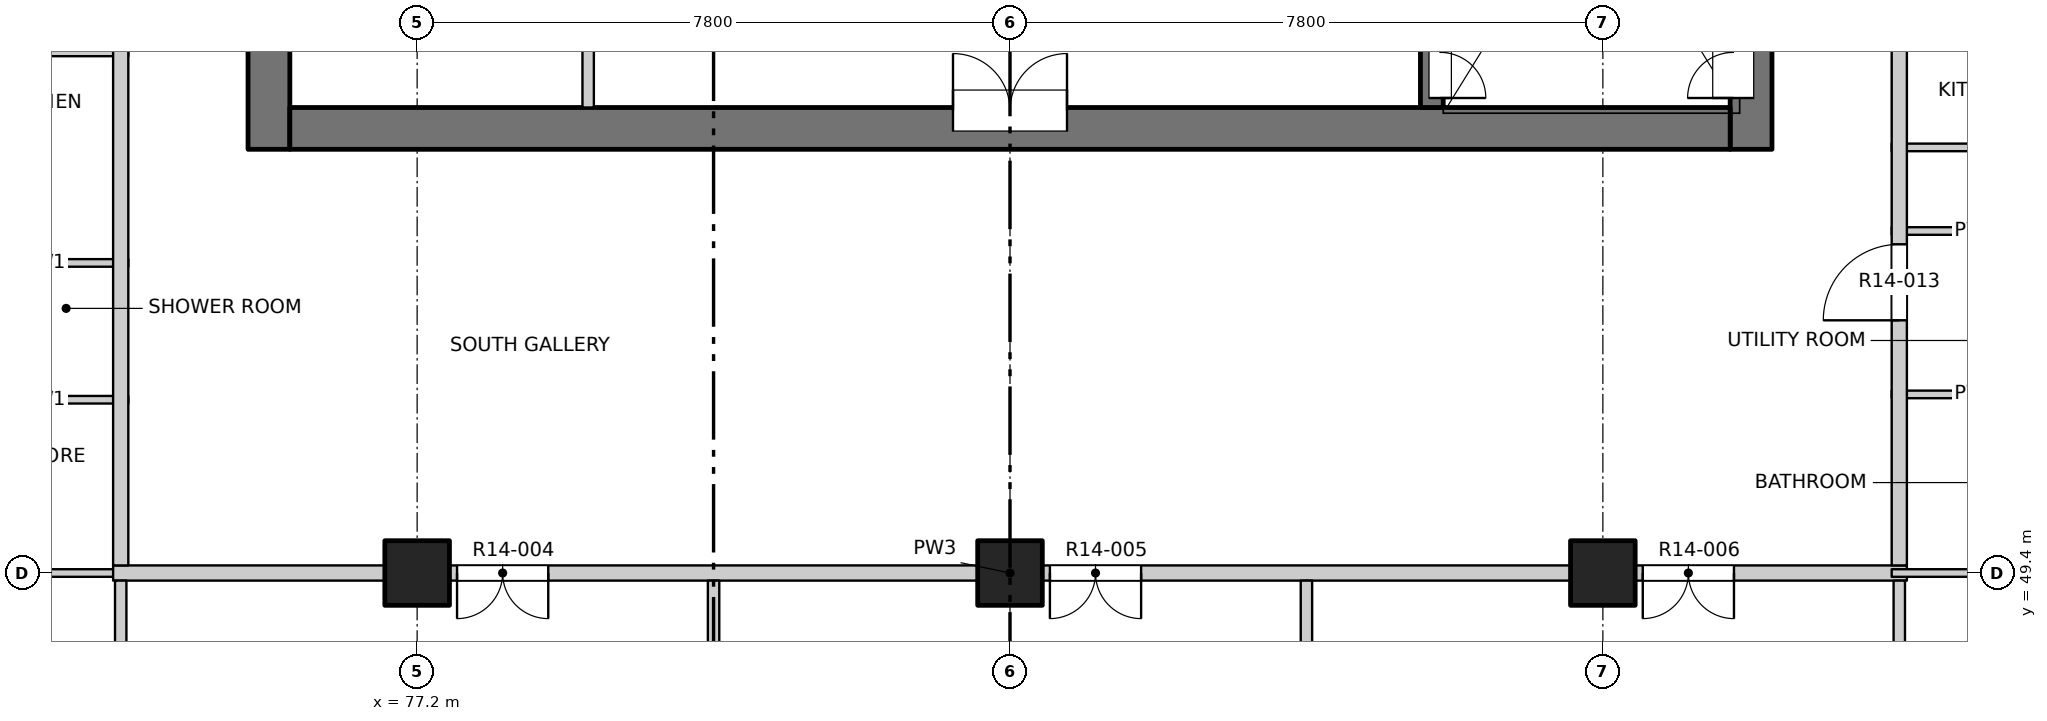
"""IFC4 building model, lengths in metres.
Left out: names, types, materials, properties, quantities, classifications, styles, units other than length and angle.
Written with IfcOpenShell. Run it as: python <this file> out.ifc"""

import sys

from ifc_helpers import new_model, si_unit, direction, frame, frame_2d, origin, origin_2d, place, context, subcontext, project, spatial, rectangle, extrude, element, fill, save


model = new_model("IFC4")
c1 = context("Model", 3, precision=1e-05, world=origin(), true_north=direction((0.0, 1.0)))
c2 = subcontext(c1, "Body", "Model", "MODEL_VIEW")
j1 = project(units=[si_unit("LENGTHUNIT", "METRE"), si_unit("PLANEANGLEUNIT", "RADIAN")], contexts=[c1])
p1 = place(None, origin())
s1 = spatial("IfcSite", under=j1, at=p1, CompositionType="ELEMENT")
p2 = place(p1, origin())
s2 = spatial("IfcBuilding", under=s1, at=p2, CompositionType="ELEMENT")
p3 = place(p2, frame((0.0, 0.0, 155.4)))
s3 = spatial("IfcBuildingStorey", under=s2, at=p3, CompositionType="ELEMENT", Elevation=155.4)
for number, where, z_axis, x_axis in (
    (1, (77.2, 49.4, -0.25), (0.0, 0.0, 1.0), (1.0, 0.0, 0.0)),
    (2, (85.0, 49.4, -0.25), (0.0, 0.0, 1.0), (1.0, 0.0, 0.0)),
    (3, (92.8, 49.4, -0.25), (0.0, 0.0, 1.0), (1.0, 0.0, 0.0)),
):
    element("IfcColumn", number, at=place(p3, frame(where, z_axis=z_axis, x_axis=x_axis)), inside=s3, PredefinedType="COLUMN", context=c2, shape_type="SweptSolid", body=[
        extrude(rectangle(XDim=0.85, YDim=0.85, at=origin_2d()), origin(), (0.0, 0.0, 1.0), 3.4),
    ])
p4 = place(p3, frame((75.25, 54.975, -0.25), z_axis=(0.0, 0.0, 1.0), x_axis=(0.0, 1.0, 0.0)))
e4 = element("IfcWall", 4, at=p4, inside=s3, PredefinedType="SOLIDWALL", context=c2, shape_type="SweptSolid", body=[
    extrude(rectangle(XDim=22.325, YDim=0.55, at=frame_2d((11.163, 0.0))), origin(), (0.0, 0.0, 1.0), 3.4),
])
p5 = place(p4, frame((7.475, 0.0, 0.25)))
e5 = element("IfcOpeningElement", 5, at=p5, cuts=e4, PredefinedType="OPENING", context=c2, shape_type="SweptSolid", body=[
    extrude(rectangle(XDim=0.9, YDim=2.1, at=frame_2d((0.45, 1.05))), frame((0.0, 0.285, 0.0), z_axis=(0.0, -1.0, 0.0), x_axis=(1.0, 0.0, 0.0)), (0.0, 0.0, 1.0), 0.57),
])
p6 = place(p4, frame((13.775, 0.0, 0.25)))
e6 = element("IfcOpeningElement", 6, at=p6, cuts=e4, PredefinedType="OPENING", context=c2, shape_type="SweptSolid", body=[
    extrude(rectangle(XDim=0.9, YDim=2.1, at=frame_2d((0.45, 1.05))), frame((0.0, 0.285, 0.0), z_axis=(0.0, -1.0, 0.0), x_axis=(1.0, 0.0, 0.0)), (0.0, 0.0, 1.0), 0.57),
])
p7 = place(p4, frame((20.075, 0.0, 0.25)))
e7 = element("IfcOpeningElement", 7, at=p7, cuts=e4, PredefinedType="OPENING", context=c2, shape_type="SweptSolid", body=[
    extrude(rectangle(XDim=0.9, YDim=2.1, at=frame_2d((0.45, 1.05))), frame((0.0, 0.285, 0.0), z_axis=(0.0, -1.0, 0.0), x_axis=(1.0, 0.0, 0.0)), (0.0, 0.0, 1.0), 0.57),
])
p8 = place(p3, frame((94.75, 54.975, -0.25), z_axis=(0.0, 0.0, 1.0), x_axis=(0.0, 1.0, 0.0)))
e8 = element("IfcWall", 8, at=p8, inside=s3, PredefinedType="SOLIDWALL", context=c2, shape_type="SweptSolid", body=[
    extrude(rectangle(XDim=6.975, YDim=0.55, at=frame_2d((3.487, 0.0))), origin(), (0.0, 0.0, 1.0), 3.4),
])
p9 = place(p8, frame((0.675, 0.0, 0.25)))
e9 = element("IfcOpeningElement", 9, at=p9, cuts=e8, PredefinedType="OPENING", context=c2, shape_type="SweptSolid", body=[
    extrude(rectangle(XDim=1.2, YDim=2.1, at=frame_2d((0.6, 1.05))), frame((0.0, 0.285, 0.0), z_axis=(0.0, -1.0, 0.0), x_axis=(1.0, 0.0, 0.0)), (0.0, 0.0, 1.0), 0.57),
])
p10 = place(p3, frame((75.525, 55.25, -0.25), z_axis=(0.0, 0.0, 1.0), x_axis=(1.0, 0.0, 0.0)))
e10 = element("IfcWall", 10, at=p10, inside=s3, PredefinedType="SOLIDWALL", context=c2, shape_type="SweptSolid", body=[
    extrude(rectangle(XDim=18.95, YDim=0.55, at=frame_2d((9.475, 0.0))), origin(), (0.0, 0.0, 1.0), 3.4),
])
p11 = place(p10, frame((8.725, 0.0, 0.25)))
e11 = element("IfcOpeningElement", 11, at=p11, cuts=e10, PredefinedType="OPENING", context=c2, shape_type="SweptSolid", body=[
    extrude(rectangle(XDim=1.5, YDim=2.1, at=frame_2d((0.75, 1.05))), frame((0.0, 0.285, 0.0), z_axis=(0.0, -1.0, 0.0), x_axis=(1.0, 0.0, 0.0)), (0.0, 0.0, 1.0), 0.57),
])
p12 = place(p3, frame((90.55, 55.525, -0.25), z_axis=(0.0, 0.0, 1.0), x_axis=(0.0, 1.0, 0.0)))
e12 = element("IfcWall", 12, at=p12, inside=s3, PredefinedType="SOLIDWALL", context=c2, shape_type="SweptSolid", body=[
    extrude(rectangle(XDim=6.425, YDim=0.3, at=frame_2d((3.212, 0.0))), origin(), (0.0, 0.0, 1.0), 3.4),
])
p13 = place(p12, frame((0.125, 0.0, 0.25)))
e13 = element("IfcOpeningElement", 13, at=p13, cuts=e12, PredefinedType="OPENING", context=c2, shape_type="SweptSolid", body=[
    extrude(rectangle(XDim=1.2, YDim=2.1, at=frame_2d((0.6, 1.05))), frame((0.0, 0.16, 0.0), z_axis=(0.0, -1.0, 0.0), x_axis=(1.0, 0.0, 0.0)), (0.0, 0.0, 1.0), 0.32),
])
p14 = place(p3, frame((65.8, 49.4, 0.0), z_axis=(0.0, 0.0, 1.0), x_axis=(1.0, 0.0, 0.0)))
e14 = element("IfcWall", 14, at=p14, inside=s3, PredefinedType="PARTITIONING", context=c2, shape_type="SweptSolid", body=[
    extrude(rectangle(XDim=7.6, YDim=0.1, at=frame_2d((3.8, 0.0))), origin(), (0.0, 0.0, 1.0), 3.15),
])
p15 = place(p14, frame((4.14, 0.0, 0.0)))
e15 = element("IfcOpeningElement", 15, at=p15, cuts=e14, PredefinedType="OPENING", context=c2, shape_type="SweptSolid", body=[
    extrude(rectangle(XDim=0.9, YDim=2.1, at=frame_2d((0.45, 1.05))), frame((0.0, 0.06, 0.0), z_axis=(0.0, -1.0, 0.0), x_axis=(1.0, 0.0, 0.0)), (0.0, 0.0, 1.0), 0.12),
])
p16 = place(p3, frame((73.2, 49.4, 0.0), z_axis=(0.0, 0.0, 1.0), x_axis=(1.0, 0.0, 0.0)))
e16 = element("IfcWall", 16, at=p16, inside=s3, PredefinedType="PARTITIONING", context=c2, shape_type="SweptSolid", body=[
    extrude(rectangle(XDim=23.6, YDim=0.2, at=frame_2d((11.8, 0.0))), origin(), (0.0, 0.0, 1.0), 3.15),
])
p17 = place(p16, frame((4.525, 0.0, 0.0)))
e17 = element("IfcOpeningElement", 17, at=p17, cuts=e16, PredefinedType="OPENING", context=c2, shape_type="SweptSolid", body=[
    extrude(rectangle(XDim=1.2, YDim=2.1, at=frame_2d((0.6, 1.05))), frame((0.0, 0.11, 0.0), z_axis=(0.0, -1.0, 0.0), x_axis=(1.0, 0.0, 0.0)), (0.0, 0.0, 1.0), 0.22),
])
p18 = place(p16, frame((12.325, 0.0, 0.0)))
e18 = element("IfcOpeningElement", 18, at=p18, cuts=e16, PredefinedType="OPENING", context=c2, shape_type="SweptSolid", body=[
    extrude(rectangle(XDim=1.2, YDim=2.1, at=frame_2d((0.6, 1.05))), frame((0.0, 0.11, 0.0), z_axis=(0.0, -1.0, 0.0), x_axis=(1.0, 0.0, 0.0)), (0.0, 0.0, 1.0), 0.22),
])
p19 = place(p16, frame((20.125, 0.0, 0.0)))
e19 = element("IfcOpeningElement", 19, at=p19, cuts=e16, PredefinedType="OPENING", context=c2, shape_type="SweptSolid", body=[
    extrude(rectangle(XDim=1.2, YDim=2.1, at=frame_2d((0.6, 1.05))), frame((0.0, 0.11, 0.0), z_axis=(0.0, -1.0, 0.0), x_axis=(1.0, 0.0, 0.0)), (0.0, 0.0, 1.0), 0.22),
])
p20 = place(p3, frame((96.6, 49.4, 0.0), z_axis=(0.0, 0.0, 1.0), x_axis=(1.0, 0.0, 0.0)))
e20 = element("IfcWall", 20, at=p20, inside=s3, PredefinedType="PARTITIONING", context=c2, shape_type="SweptSolid", body=[
    extrude(rectangle(XDim=7.6, YDim=0.1, at=frame_2d((3.8, 0.0))), origin(), (0.0, 0.0, 1.0), 3.15),
])
p21 = place(p20, frame((2.56, 0.0, 0.0)))
e21 = element("IfcOpeningElement", 21, at=p21, cuts=e20, PredefinedType="OPENING", context=c2, shape_type="SweptSolid", body=[
    extrude(rectangle(XDim=0.9, YDim=2.1, at=frame_2d((0.45, 1.05))), frame((0.0, 0.06, 0.0), z_axis=(0.0, -1.0, 0.0), x_axis=(1.0, 0.0, 0.0)), (0.0, 0.0, 1.0), 0.12),
])
for number, where, z_axis, x_axis in (
    (22, (71.18, 51.68, 0.0), (0.0, 0.0, 1.0), (1.0, 0.0, 0.0)),
    (23, (96.6, 51.75, 0.0), (0.0, 0.0, 1.0), (1.0, 0.0, 0.0)),
    (24, (71.18, 53.48, 0.0), (0.0, 0.0, 1.0), (1.0, 0.0, 0.0)),
    (25, (96.6, 53.9, 0.0), (0.0, 0.0, 1.0), (1.0, 0.0, 0.0)),
    (26, (96.6, 55.0, 0.0), (0.0, 0.0, 1.0), (1.0, 0.0, 0.0)),
    (27, (71.18, 56.25, 0.0), (0.0, 0.0, 1.0), (1.0, 0.0, 0.0)),
):
    element("IfcWall", number, at=place(p3, frame(where, z_axis=z_axis, x_axis=x_axis)), inside=s3, PredefinedType="PARTITIONING", context=c2, shape_type="SweptSolid", body=[
        extrude(rectangle(XDim=2.22, YDim=0.1, at=frame_2d((1.11, 0.0))), origin(), (0.0, 0.0, 1.0), 3.15),
    ])
p22 = place(p3, frame((73.3, 45.8, 0.0), z_axis=(0.0, 0.0, 1.0), x_axis=(0.0, 1.0, 0.0)))
e28 = element("IfcWall", 28, at=p22, inside=s3, PredefinedType="PARTITIONING", context=c2, shape_type="SweptSolid", body=[
    extrude(rectangle(XDim=3.5, YDim=0.15, at=frame_2d((1.75, 0.0))), origin(), (0.0, 0.0, 1.0), 3.15),
])
p23 = place(p3, frame((73.3, 49.5, 0.0), z_axis=(0.0, 0.0, 1.0), x_axis=(0.0, 1.0, 0.0)))
e29 = element("IfcWall", 29, at=p23, inside=s3, PredefinedType="PARTITIONING", context=c2, shape_type="SweptSolid", body=[
    extrude(rectangle(XDim=34.7, YDim=0.2, at=frame_2d((17.35, 0.0))), origin(), (0.0, 0.0, 1.0), 3.15),
])
p24 = place(p23, frame((10.125, 0.0, 0.0)))
e30 = element("IfcOpeningElement", 30, at=p24, cuts=e29, PredefinedType="OPENING", context=c2, shape_type="SweptSolid", body=[
    extrude(rectangle(XDim=1.0, YDim=2.1, at=frame_2d((0.5, 1.05))), frame((0.0, 0.11, 0.0), z_axis=(0.0, -1.0, 0.0), x_axis=(1.0, 0.0, 0.0)), (0.0, 0.0, 1.0), 0.22),
])
p25 = place(p23, frame((14.575, 0.0, 0.0)))
e31 = element("IfcOpeningElement", 31, at=p25, cuts=e29, PredefinedType="OPENING", context=c2, shape_type="SweptSolid", body=[
    extrude(rectangle(XDim=1.0, YDim=2.1, at=frame_2d((0.5, 1.05))), frame((0.0, 0.11, 0.0), z_axis=(0.0, -1.0, 0.0), x_axis=(1.0, 0.0, 0.0)), (0.0, 0.0, 1.0), 0.22),
])
p26 = place(p23, frame((26.575, 0.0, 0.0)))
e32 = element("IfcOpeningElement", 32, at=p26, cuts=e29, PredefinedType="OPENING", context=c2, shape_type="SweptSolid", body=[
    extrude(rectangle(XDim=1.0, YDim=2.1, at=frame_2d((0.5, 1.05))), frame((0.0, 0.11, 0.0), z_axis=(0.0, -1.0, 0.0), x_axis=(1.0, 0.0, 0.0)), (0.0, 0.0, 1.0), 0.22),
])
p27 = place(p3, frame((79.45, 55.525, 0.0), z_axis=(0.0, 0.0, 1.0), x_axis=(0.0, 1.0, 0.0)))
e33 = element("IfcWall", 33, at=p27, inside=s3, PredefinedType="PARTITIONING", context=c2, shape_type="SweptSolid", body=[
    extrude(rectangle(XDim=5.375, YDim=0.15, at=frame_2d((2.688, 0.0))), origin(), (0.0, 0.0, 1.0), 3.15),
])
p28 = place(p27, frame((2.175, 0.0, 0.0)))
e34 = element("IfcOpeningElement", 34, at=p28, cuts=e33, PredefinedType="OPENING", context=c2, shape_type="SweptSolid", body=[
    extrude(rectangle(XDim=0.9, YDim=2.1, at=frame_2d((0.45, 1.05))), frame((0.0, 0.085, 0.0), z_axis=(0.0, -1.0, 0.0), x_axis=(1.0, 0.0, 0.0)), (0.0, 0.0, 1.0), 0.17),
])
for number, where, z_axis, x_axis in (
    (35, (81.1, 45.8, 0.0), (0.0, 0.0, 1.0), (0.0, 1.0, 0.0)),
    (36, (88.9, 45.8, 0.0), (0.0, 0.0, 1.0), (0.0, 1.0, 0.0)),
):
    element("IfcWall", number, at=place(p3, frame(where, z_axis=z_axis, x_axis=x_axis)), inside=s3, PredefinedType="PARTITIONING", context=c2, shape_type="SweptSolid", body=[
        extrude(rectangle(XDim=3.5, YDim=0.15, at=frame_2d((1.75, 0.0))), origin(), (0.0, 0.0, 1.0), 2.55),
    ])
p29 = place(p3, frame((96.7, 45.8, 0.0), z_axis=(0.0, 0.0, 1.0), x_axis=(0.0, 1.0, 0.0)))
e37 = element("IfcWall", 37, at=p29, inside=s3, PredefinedType="PARTITIONING", context=c2, shape_type="SweptSolid", body=[
    extrude(rectangle(XDim=3.5, YDim=0.15, at=frame_2d((1.75, 0.0))), origin(), (0.0, 0.0, 1.0), 3.15),
])
p30 = place(p3, frame((96.7, 49.5, 0.0), z_axis=(0.0, 0.0, 1.0), x_axis=(0.0, 1.0, 0.0)))
e38 = element("IfcWall", 38, at=p30, inside=s3, PredefinedType="PARTITIONING", context=c2, shape_type="SweptSolid", body=[
    extrude(rectangle(XDim=34.7, YDim=0.2, at=frame_2d((17.35, 0.0))), origin(), (0.0, 0.0, 1.0), 3.15),
])
p31 = place(p30, frame((3.225, 0.0, 0.0)))
e39 = element("IfcOpeningElement", 39, at=p31, cuts=e38, PredefinedType="OPENING", context=c2, shape_type="SweptSolid", body=[
    extrude(rectangle(XDim=1.0, YDim=2.1, at=frame_2d((0.5, 1.05))), frame((0.0, 0.11, 0.0), z_axis=(0.0, -1.0, 0.0), x_axis=(1.0, 0.0, 0.0)), (0.0, 0.0, 1.0), 0.22),
])
p32 = place(p30, frame((19.775, 0.0, 0.0)))
e40 = element("IfcOpeningElement", 40, at=p32, cuts=e38, PredefinedType="OPENING", context=c2, shape_type="SweptSolid", body=[
    extrude(rectangle(XDim=1.0, YDim=2.1, at=frame_2d((0.5, 1.05))), frame((0.0, 0.11, 0.0), z_axis=(0.0, -1.0, 0.0), x_axis=(1.0, 0.0, 0.0)), (0.0, 0.0, 1.0), 0.22),
])
p33 = place(p30, frame((24.125, 0.0, 0.0)))
e41 = element("IfcOpeningElement", 41, at=p33, cuts=e38, PredefinedType="OPENING", context=c2, shape_type="SweptSolid", body=[
    extrude(rectangle(XDim=1.0, YDim=2.1, at=frame_2d((0.5, 1.05))), frame((0.0, 0.11, 0.0), z_axis=(0.0, -1.0, 0.0), x_axis=(1.0, 0.0, 0.0)), (0.0, 0.0, 1.0), 0.22),
])
p34 = place(p17, origin())
e42 = element("IfcDoor", 42, at=p34, inside=s3, OperationType="DOUBLE_DOOR_SINGLE_SWING", PredefinedType="DOOR", context=c2, shape_type="SweptSolid", body=[
    extrude(rectangle(XDim=1.2, YDim=2.1, at=frame_2d((0.6, 1.05))), frame((0.0, 0.025, 0.0), z_axis=(0.0, -1.0, 0.0), x_axis=(1.0, 0.0, 0.0)), (0.0, 0.0, 1.0), 0.05),
])
fill(e17, e42)
p35 = place(p18, origin())
e43 = element("IfcDoor", 43, at=p35, inside=s3, OperationType="DOUBLE_DOOR_SINGLE_SWING", PredefinedType="DOOR", context=c2, shape_type="SweptSolid", body=[
    extrude(rectangle(XDim=1.2, YDim=2.1, at=frame_2d((0.6, 1.05))), frame((0.0, 0.025, 0.0), z_axis=(0.0, -1.0, 0.0), x_axis=(1.0, 0.0, 0.0)), (0.0, 0.0, 1.0), 0.05),
])
fill(e18, e43)
p36 = place(p19, origin())
e44 = element("IfcDoor", 44, at=p36, inside=s3, OperationType="DOUBLE_DOOR_SINGLE_SWING", PredefinedType="DOOR", context=c2, shape_type="SweptSolid", body=[
    extrude(rectangle(XDim=1.2, YDim=2.1, at=frame_2d((0.6, 1.05))), frame((0.0, 0.025, 0.0), z_axis=(0.0, -1.0, 0.0), x_axis=(1.0, 0.0, 0.0)), (0.0, 0.0, 1.0), 0.05),
])
fill(e19, e44)
p37 = place(p31, origin())
e45 = element("IfcDoor", 45, at=p37, inside=s3, OperationType="SINGLE_SWING_RIGHT", PredefinedType="DOOR", context=c2, shape_type="SweptSolid", body=[
    extrude(rectangle(XDim=1.0, YDim=2.1, at=frame_2d((0.5, 1.05))), frame((0.0, 0.025, 0.0), z_axis=(0.0, -1.0, 0.0), x_axis=(1.0, 0.0, 0.0)), (0.0, 0.0, 1.0), 0.05),
])
fill(e39, e45)
p38 = place(p11, origin())
e46 = element("IfcDoor", 46, at=p38, inside=s3, OperationType="DOUBLE_DOOR_SINGLE_SWING", PredefinedType="DOOR", context=c2, shape_type="SweptSolid", body=[
    extrude(rectangle(XDim=1.5, YDim=2.1, at=frame_2d((0.75, 1.05))), frame((0.0, 0.26, 0.0), z_axis=(0.0, -1.0, 0.0), x_axis=(1.0, 0.0, 0.0)), (0.0, 0.0, 1.0), 0.05),
])
fill(e11, e46)
p39 = place(p13, origin())
e47 = element("IfcDoor", 47, at=p39, inside=s3, OperationType="DOUBLE_DOOR_SINGLE_SWING", PredefinedType="DOOR", context=c2, shape_type="SweptSolid", body=[
    extrude(rectangle(XDim=1.2, YDim=2.1, at=frame_2d((0.6, 1.05))), frame((0.0, -0.085, 0.0), z_axis=(0.0, -1.0, 0.0), x_axis=(1.0, 0.0, 0.0)), (0.0, 0.0, 1.0), 0.05),
])
fill(e13, e47)
p40 = place(p9, origin())
e48 = element("IfcDoor", 48, at=p40, inside=s3, OperationType="DOUBLE_DOOR_SINGLE_SWING", PredefinedType="DOOR", context=c2, shape_type="SweptSolid", body=[
    extrude(rectangle(XDim=1.2, YDim=2.1, at=frame_2d((0.6, 1.05))), frame((0.0, 0.26, 0.0), z_axis=(0.0, -1.0, 0.0), x_axis=(1.0, 0.0, 0.0)), (0.0, 0.0, 1.0), 0.05),
])
fill(e9, e48)
save(model, sys.argv[1])
